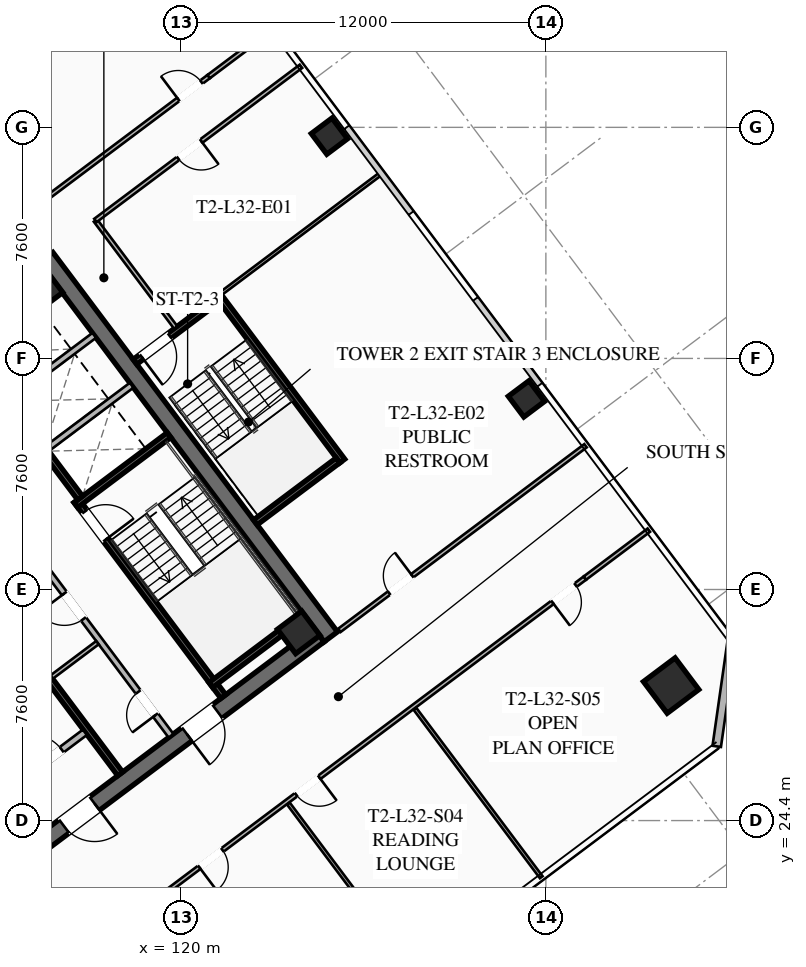
"""IFC4 building model, lengths in metres.
Left out: names, types, materials, properties, quantities, classifications, styles, units other than length and angle.
Written with IfcOpenShell. Run it as: python <this file> out.ifc"""

import sys

from ifc_helpers import new_model, si_unit, direction, frame, frame_2d, origin, origin_2d, place, context, subcontext, project, spatial, rectangle, hollow_rectangle, extrude, element, fill, save


model = new_model("IFC4")
c1 = context("Model", 3, precision=1e-05, world=origin(), true_north=direction((0.0, 1.0)))
c2 = subcontext(c1, "Body", "Model", "MODEL_VIEW")
j1 = project(units=[si_unit("LENGTHUNIT", "METRE"), si_unit("PLANEANGLEUNIT", "RADIAN")], contexts=[c1])
p1 = place(None, origin())
s1 = spatial("IfcSite", under=j1, at=p1, CompositionType="ELEMENT")
p2 = place(p1, origin())
s2 = spatial("IfcBuilding", under=s1, at=p2, CompositionType="ELEMENT")
p3 = place(p2, frame((0.0, 0.0, 121.5)))
s3 = spatial("IfcBuildingStorey", under=s2, at=p3, CompositionType="ELEMENT", Elevation=121.5)
p4 = place(p3, frame((115.564, 42.923, 0.0), z_axis=(0.0, 0.0, 1.0), x_axis=(0.600005007985, -0.799996243986, 0.0)))
e1 = element("IfcWall", 1, at=p4, inside=s3, PredefinedType="SHEAR", context=c2, shape_type="SweptSolid", body=[
    extrude(rectangle(XDim=15.6, YDim=0.55, at=frame_2d((7.8, 0.0))), origin(), (0.0, 0.0, 1.0), 3.55),
])
p5 = place(p3, frame((124.539, 30.498, 0.0), z_axis=(0.0, 0.0, 1.0), x_axis=(-0.799998054672, -0.600002593761, 0.0)))
e2 = element("IfcWall", 2, at=p5, inside=s3, PredefinedType="SHEAR", context=c2, shape_type="SweptSolid", body=[
    extrude(rectangle(XDim=15.06, YDim=0.55, at=frame_2d((7.53, 0.0))), origin(), (0.0, 0.0, 1.0), 3.55),
])
p6 = place(p5, frame((9.23, 0.0, 0.0)))
e3 = element("IfcOpeningElement", 3, at=p6, cuts=e2, PredefinedType="OPENING", context=c2, shape_type="SweptSolid", body=[
    extrude(rectangle(XDim=1.25, YDim=2.25, at=frame_2d((0.625, 1.125))), frame((0.0, 0.285, 0.0), z_axis=(0.0, -1.0, 0.0), x_axis=(1.0, 0.0, 0.0)), (0.0, 0.0, 1.0), 0.57),
])
p7 = place(p5, frame((4.18, 0.0, 0.0)))
e4 = element("IfcOpeningElement", 4, at=p7, cuts=e2, PredefinedType="OPENING", context=c2, shape_type="SweptSolid", body=[
    extrude(rectangle(XDim=1.25, YDim=2.25, at=frame_2d((0.625, 1.125))), frame((0.0, 0.285, 0.0), z_axis=(0.0, -1.0, 0.0), x_axis=(1.0, 0.0, 0.0)), (0.0, 0.0, 1.0), 0.57),
])
for number, where, z_axis, x_axis in (
    (5, (123.87, 30.59, 0.0), (0.0, 0.0, 1.0), (0.8, 0.6, 0.0)),
    (6, (115.41, 41.87, 0.0), (0.0, 0.0, 1.0), (0.8, 0.6, 0.0)),
):
    element("IfcColumn", number, at=place(p3, frame(where, z_axis=z_axis, x_axis=x_axis)), inside=s3, PredefinedType="COLUMN", context=c2, shape_type="SweptSolid", body=[
        extrude(hollow_rectangle(XDim=1.0, YDim=1.0, WallThickness=0.04, at=origin_2d()), origin(), (0.0, 0.0, 1.0), 3.37),
    ])
p8 = place(p3, frame((136.12, 28.84, 0.0), z_axis=(0.0, 0.0, 1.0), x_axis=(0.799999996291, 0.600000004945, 0.0)))
e7 = element("IfcColumn", 7, at=p8, inside=s3, PredefinedType="COLUMN", context=c2, shape_type="SweptSolid", body=[
    extrude(hollow_rectangle(XDim=1.3, YDim=1.3, WallThickness=0.05, at=origin_2d()), origin(), (0.0, 0.0, 1.0), 3.37),
])
for number, where, z_axis, x_axis in (
    (8, (131.36, 38.27, 0.0), (0.0, 0.0, 1.0), (0.8, 0.6, 0.0)),
    (9, (124.88, 46.91, 0.0), (0.0, 0.0, 1.0), (0.8, 0.6, 0.0)),
):
    element("IfcColumn", number, at=place(p3, frame(where, z_axis=z_axis, x_axis=x_axis)), inside=s3, PredefinedType="COLUMN", context=c2, shape_type="SweptSolid", body=[
        extrude(hollow_rectangle(XDim=0.85, YDim=0.85, WallThickness=0.035, at=origin_2d()), origin(), (0.0, 0.0, 1.0), 3.37),
    ])
p9 = place(p3, frame((138.12, 30.34, 0.0), z_axis=(0.0, 0.0, 1.0), x_axis=(-0.141421356237, -0.989949493661, 0.0)))
e10 = element("IfcWall", 10, at=p9, inside=s3, PredefinedType="SOLIDWALL", context=c2, shape_type="SweptSolid", body=[
    extrude(rectangle(XDim=3.536, YDim=0.28, at=frame_2d((1.768, 0.0))), origin(), (0.0, 0.0, 1.0), 3.37),
])
p10 = place(p3, frame((116.56, 34.92, 0.0), z_axis=(0.0, 0.0, 1.0), x_axis=(0.59999029481, -0.8000072788, 0.0)))
e11 = element("IfcWall", 11, at=p10, inside=s3, PredefinedType="SHEAR", context=c2, shape_type="SweptSolid", body=[
    extrude(rectangle(XDim=8.05, YDim=0.2, at=frame_2d((4.025, 0.0))), origin(), (0.0, 0.0, 1.0), 3.37),
])
p11 = place(p10, frame((0.45, 0.0, 0.0)))
e12 = element("IfcOpeningElement", 12, at=p11, cuts=e11, PredefinedType="OPENING", context=c2, shape_type="SweptSolid", body=[
    extrude(rectangle(XDim=1.15, YDim=2.2, at=frame_2d((0.575, 1.1))), frame((0.0, 0.11, 0.0), z_axis=(0.0, -1.0, 0.0), x_axis=(1.0, 0.0, 0.0)), (0.0, 0.0, 1.0), 0.22),
])
for number, where, z_axis, x_axis in (
    (13, (116.54, 34.78, 0.0), (0.0, 0.0, 1.0), (0.8, 0.6, 0.0)),
    (14, (120.98, 28.86, 0.0), (0.0, 0.0, 1.0), (0.8, 0.6, 0.0)),
):
    element("IfcWall", number, at=place(p3, frame(where, z_axis=z_axis, x_axis=x_axis)), inside=s3, PredefinedType="SHEAR", context=c2, shape_type="SweptSolid", body=[
        extrude(rectangle(XDim=3.83, YDim=0.2, at=frame_2d((1.915, 0.0))), origin(), (0.0, 0.0, 1.0), 3.37),
    ])
p12 = place(p3, frame((117.998, 25.936, 0.0), z_axis=(0.0, 0.0, 1.0), x_axis=(-0.600002693989, 0.799997979501, 0.0)))
e15 = element("IfcWall", 15, at=p12, inside=s3, PredefinedType="SHEAR", context=c2, shape_type="SweptSolid", body=[
    extrude(rectangle(XDim=14.5, YDim=0.2, at=frame_2d((7.25, 0.0))), origin(), (0.0, 0.0, 1.0), 3.37),
])
p13 = place(p3, frame((114.316, 25.412, 0.0), z_axis=(0.0, 0.0, 1.0), x_axis=(0.800018601094, 0.59997519774, 0.0)))
e16 = element("IfcWall", 16, at=p13, inside=s3, PredefinedType="SOLIDWALL", context=c2, shape_type="SweptSolid", body=[
    extrude(rectangle(XDim=3.15, YDim=0.22, at=frame_2d((1.575, 0.0))), origin(), (0.0, 0.0, 1.0), 2.723),
])
p14 = place(p13, frame((0.95, 0.0, 0.0)))
e17 = element("IfcOpeningElement", 17, at=p14, cuts=e16, PredefinedType="OPENING", context=c2, shape_type="SweptSolid", body=[
    extrude(rectangle(XDim=1.25, YDim=2.25, at=frame_2d((0.625, 1.125))), frame((0.0, 0.12, 0.0), z_axis=(0.0, -1.0, 0.0), x_axis=(1.0, 0.0, 0.0)), (0.0, 0.0, 1.0), 0.24),
])
p15 = place(p3, frame((112.81, 40.17, 0.0), z_axis=(0.0, 0.0, 1.0), x_axis=(0.599993943644, -0.800004542231, 0.0)))
e18 = element("IfcWall", 18, at=p15, inside=s3, PredefinedType="SHEAR", context=c2, shape_type="SweptSolid", body=[
    extrude(rectangle(XDim=6.45, YDim=0.2, at=frame_2d((3.225, 0.0))), origin(), (0.0, 0.0, 1.0), 3.37),
])
for number, where, z_axis, x_axis in (
    (19, (115.59, 36.63, 0.0), (0.0, 0.0, 1.0), (0.8, 0.6, 0.0)),
    (20, (114.36, 38.27, 0.0), (0.0, 0.0, 1.0), (0.8, 0.6, 0.0)),
):
    element("IfcWall", number, at=place(p3, frame(where, z_axis=z_axis, x_axis=x_axis)), inside=s3, PredefinedType="SOLIDWALL", context=c2, shape_type="SweptSolid", body=[
        extrude(rectangle(XDim=3.48, YDim=0.2, at=frame_2d((1.74, 0.0))), origin(), (0.0, 0.0, 1.0), 3.37),
    ])
p16 = place(p3, frame((119.67, 27.19, 0.0), z_axis=(0.0, 0.0, 1.0), x_axis=(-0.599988677396, 0.800008491828, 0.0)))
e21 = element("IfcWall", 21, at=p16, inside=s3, PredefinedType="SOLIDWALL", context=c2, shape_type="SweptSolid", body=[
    extrude(rectangle(XDim=6.9, YDim=0.2, at=frame_2d((3.45, 0.0))), origin(), (0.0, 0.0, 1.0), 2.723),
])
p17 = place(p16, frame((0.85, 0.0, 0.0)))
e22 = element("IfcOpeningElement", 22, at=p17, cuts=e21, PredefinedType="OPENING", context=c2, shape_type="SweptSolid", body=[
    extrude(rectangle(XDim=0.95, YDim=2.05, at=frame_2d((0.475, 1.025))), frame((0.0, 0.11, 0.0), z_axis=(0.0, -1.0, 0.0), x_axis=(1.0, 0.0, 0.0)), (0.0, 0.0, 1.0), 0.22),
])
p18 = place(p16, frame((4.8, 0.0, 0.0)))
e23 = element("IfcOpeningElement", 23, at=p18, cuts=e21, PredefinedType="OPENING", context=c2, shape_type="SweptSolid", body=[
    extrude(rectangle(XDim=1.05, YDim=2.2, at=frame_2d((0.525, 1.1))), frame((0.0, 0.11, 0.0), z_axis=(0.0, -1.0, 0.0), x_axis=(1.0, 0.0, 0.0)), (0.0, 0.0, 1.0), 0.22),
])
p19 = place(p3, frame((115.746, 29.122, 0.0), z_axis=(0.0, 0.0, 1.0), x_axis=(0.8, 0.6, 0.0)))
e24 = element("IfcWall", 24, at=p19, inside=s3, PredefinedType="PARTITIONING", context=c2, shape_type="SweptSolid", body=[
    extrude(rectangle(XDim=1.88, YDim=0.135, at=frame_2d((0.94, 0.0))), origin(), (0.0, 0.0, 1.0), 2.723),
])
p20 = place(p3, frame((125.304, 36.228, 0.0), z_axis=(0.0, 0.0, 1.0), x_axis=(-0.59998851072, 0.800008616831, 0.0)))
e25 = element("IfcWall", 25, at=p20, inside=s3, PredefinedType="SHEAR", context=c2, shape_type="SweptSolid", body=[
    extrude(rectangle(XDim=6.8, YDim=0.2, at=frame_2d((3.4, 0.0))), origin(), (0.0, 0.0, 1.0), 3.37),
])
p21 = place(p3, frame((121.204, 41.528, 0.0), z_axis=(0.0, 0.0, 1.0), x_axis=(-0.800017232136, -0.599977023131, 0.0)))
e26 = element("IfcWall", 26, at=p21, inside=s3, PredefinedType="SHEAR", context=c2, shape_type="SweptSolid", body=[
    extrude(rectangle(XDim=3.4, YDim=0.2, at=frame_2d((1.7, 0.0))), origin(), (0.0, 0.0, 1.0), 3.37),
])
p22 = place(p21, frame((1.975, 0.0, 0.0)))
e27 = element("IfcOpeningElement", 27, at=p22, cuts=e26, PredefinedType="OPENING", context=c2, shape_type="SweptSolid", body=[
    extrude(rectangle(XDim=1.15, YDim=2.2, at=frame_2d((0.575, 1.1))), frame((0.0, 0.11, 0.0), z_axis=(0.0, -1.0, 0.0), x_axis=(1.0, 0.0, 0.0)), (0.0, 0.0, 1.0), 0.22),
])
p23 = place(p3, frame((122.444, 34.208, 0.0), z_axis=(0.0, 0.0, 1.0), x_axis=(0.79999138319, 0.600011488909, 0.0)))
e28 = element("IfcWall", 28, at=p23, inside=s3, PredefinedType="SHEAR", context=c2, shape_type="SweptSolid", body=[
    extrude(rectangle(XDim=3.4, YDim=0.2, at=frame_2d((1.7, 0.0))), origin(), (0.0, 0.0, 1.0), 3.37),
])
p24 = place(p3, frame((119.824, 40.618, 0.0), z_axis=(0.0, 0.0, 1.0), x_axis=(-0.599982243973, 0.800013316712, 0.0)))
e29 = element("IfcWall", 29, at=p24, inside=s3, PredefinedType="PARTITIONING", context=c2, shape_type="SweptSolid", body=[
    extrude(rectangle(XDim=4.4, YDim=0.135, at=frame_2d((2.2, 0.0))), origin(), (0.0, 0.0, 1.0), 2.723),
])
p25 = place(p3, frame((95.87, 30.09, 0.0), z_axis=(0.0, 0.0, 1.0), x_axis=(0.799997191971, 0.600003744021, 0.0)))
e30 = element("IfcWall", 30, at=p25, inside=s3, PredefinedType="PARTITIONING", context=c2, shape_type="SweptSolid", body=[
    extrude(rectangle(XDim=31.3, YDim=0.135, at=frame_2d((15.65, 0.0))), origin(), (0.0, 0.0, 1.0), 2.723),
])
p26 = place(p25, frame((0.3, 0.0, 0.0)))
e31 = element("IfcOpeningElement", 31, at=p26, cuts=e30, PredefinedType="OPENING", context=c2, shape_type="SweptSolid", body=[
    extrude(rectangle(XDim=0.95, YDim=2.05, at=frame_2d((0.475, 1.025))), frame((0.0, 0.077, 0.0), z_axis=(0.0, -1.0, 0.0), x_axis=(1.0, 0.0, 0.0)), (0.0, 0.0, 1.0), 0.155),
])
p27 = place(p25, frame((30.05, 0.0, 0.0)))
e32 = element("IfcOpeningElement", 32, at=p27, cuts=e30, PredefinedType="OPENING", context=c2, shape_type="SweptSolid", body=[
    extrude(rectangle(XDim=0.95, YDim=2.05, at=frame_2d((0.475, 1.025))), frame((0.0, 0.077, 0.0), z_axis=(0.0, -1.0, 0.0), x_axis=(1.0, 0.0, 0.0)), (0.0, 0.0, 1.0), 0.155),
])
p28 = place(p3, frame((120.91, 48.87, 0.0), z_axis=(0.0, 0.0, 1.0), x_axis=(0.80002227902, 0.599970293491, 0.0)))
e33 = element("IfcWall", 33, at=p28, inside=s3, PredefinedType="PARTITIONING", context=c2, shape_type="SweptSolid", body=[
    extrude(rectangle(XDim=2.63, YDim=0.135, at=frame_2d((1.315, 0.0))), origin(), (0.0, 0.0, 1.0), 2.723),
])
p29 = place(p3, frame((133.282, 32.374, 0.0), z_axis=(0.0, 0.0, 1.0), x_axis=(-0.8, -0.6, 0.0)))
e34 = element("IfcWall", 34, at=p29, inside=s3, PredefinedType="PARTITIONING", context=c2, shape_type="SweptSolid", body=[
    extrude(rectangle(XDim=31.3, YDim=0.135, at=frame_2d((15.65, 0.0))), origin(), (0.0, 0.0, 1.0), 2.723),
])
p30 = place(p29, frame((29.97, 0.0, 0.0)))
e35 = element("IfcOpeningElement", 35, at=p30, cuts=e34, PredefinedType="OPENING", context=c2, shape_type="SweptSolid", body=[
    extrude(rectangle(XDim=0.95, YDim=2.05, at=frame_2d((0.475, 1.025))), frame((0.0, 0.077, 0.0), z_axis=(0.0, -1.0, 0.0), x_axis=(1.0, 0.0, 0.0)), (0.0, 0.0, 1.0), 0.155),
])
p31 = place(p29, frame((19.151, 0.0, 0.0)))
e36 = element("IfcOpeningElement", 36, at=p31, cuts=e34, PredefinedType="OPENING", context=c2, shape_type="SweptSolid", body=[
    extrude(rectangle(XDim=0.95, YDim=2.05, at=frame_2d((0.475, 1.025))), frame((0.0, 0.077, 0.0), z_axis=(0.0, -1.0, 0.0), x_axis=(1.0, 0.0, 0.0)), (0.0, 0.0, 1.0), 0.155),
])
p32 = place(p29, frame((14.901, 0.0, 0.0)))
e37 = element("IfcOpeningElement", 37, at=p32, cuts=e34, PredefinedType="OPENING", context=c2, shape_type="SweptSolid", body=[
    extrude(rectangle(XDim=0.95, YDim=2.05, at=frame_2d((0.475, 1.025))), frame((0.0, 0.077, 0.0), z_axis=(0.0, -1.0, 0.0), x_axis=(1.0, 0.0, 0.0)), (0.0, 0.0, 1.0), 0.155),
])
p33 = place(p29, frame((10.92, 0.0, 0.0)))
e38 = element("IfcOpeningElement", 38, at=p33, cuts=e34, PredefinedType="OPENING", context=c2, shape_type="SweptSolid", body=[
    extrude(rectangle(XDim=0.95, YDim=2.05, at=frame_2d((0.475, 1.025))), frame((0.0, 0.077, 0.0), z_axis=(0.0, -1.0, 0.0), x_axis=(1.0, 0.0, 0.0)), (0.0, 0.0, 1.0), 0.155),
])
p34 = place(p29, frame((0.38, 0.0, 0.0)))
e39 = element("IfcOpeningElement", 39, at=p34, cuts=e34, PredefinedType="OPENING", context=c2, shape_type="SweptSolid", body=[
    extrude(rectangle(XDim=0.95, YDim=2.05, at=frame_2d((0.475, 1.025))), frame((0.0, 0.077, 0.0), z_axis=(0.0, -1.0, 0.0), x_axis=(1.0, 0.0, 0.0)), (0.0, 0.0, 1.0), 0.155),
])
p35 = place(p3, frame((133.282, 32.374, 0.0), z_axis=(0.0, 0.0, 1.0), x_axis=(0.80002227902, 0.599970293491, 0.0)))
e40 = element("IfcWall", 40, at=p35, inside=s3, PredefinedType="PARTITIONING", context=c2, shape_type="SweptSolid", body=[
    extrude(rectangle(XDim=2.63, YDim=0.135, at=frame_2d((1.315, 0.0))), origin(), (0.0, 0.0, 1.0), 2.723),
])
p36 = place(p3, frame((127.688, 19.416, 0.0), z_axis=(0.0, 0.0, 1.0), x_axis=(-0.6, 0.8, 0.0)))
e41 = element("IfcWall", 41, at=p36, inside=s3, PredefinedType="PARTITIONING", context=c2, shape_type="SweptSolid", body=[
    extrude(rectangle(XDim=6.93, YDim=0.11, at=frame_2d((3.465, 0.0))), origin(), (0.0, 0.0, 1.0), 2.723),
])
p37 = place(p3, frame((131.848, 22.536, 0.0), z_axis=(0.0, 0.0, 1.0), x_axis=(-0.599983090003, 0.800012682219, 0.0)))
e42 = element("IfcWall", 42, at=p37, inside=s3, PredefinedType="PARTITIONING", context=c2, shape_type="SweptSolid", body=[
    extrude(rectangle(XDim=6.93, YDim=0.11, at=frame_2d((3.465, 0.0))), origin(), (0.0, 0.0, 1.0), 2.723),
])
p38 = place(p3, frame((123.944, 49.208, 0.0), z_axis=(0.0, 0.0, 1.0), x_axis=(-0.799996532921, -0.600004622744, 0.0)))
e43 = element("IfcWall", 43, at=p38, inside=s3, PredefinedType="PARTITIONING", context=c2, shape_type="SweptSolid", body=[
    extrude(rectangle(XDim=8.45, YDim=0.135, at=frame_2d((4.225, 0.0))), origin(), (0.0, 0.0, 1.0), 2.723),
])
p39 = place(p38, frame((4.1, 0.0, 0.0)))
e44 = element("IfcOpeningElement", 44, at=p39, cuts=e43, PredefinedType="OPENING", context=c2, shape_type="SweptSolid", body=[
    extrude(rectangle(XDim=0.95, YDim=2.05, at=frame_2d((0.475, 1.025))), frame((0.0, 0.077, 0.0), z_axis=(0.0, -1.0, 0.0), x_axis=(1.0, 0.0, 0.0)), (0.0, 0.0, 1.0), 0.155),
])
p40 = place(p3, frame((125.208, 30.656, 0.0), z_axis=(0.0, 0.0, 1.0), x_axis=(0.799997105034, 0.600003859935, 0.0)))
e45 = element("IfcWall", 45, at=p40, inside=s3, PredefinedType="PARTITIONING", context=c2, shape_type="SweptSolid", body=[
    extrude(rectangle(XDim=10.12, YDim=0.135, at=frame_2d((5.06, 0.0))), origin(), (0.0, 0.0, 1.0), 2.723),
])
p41 = place(p40, frame((2.045, 0.0, 0.0)))
e46 = element("IfcOpeningElement", 46, at=p41, cuts=e45, PredefinedType="OPENING", context=c2, shape_type="SweptSolid", body=[
    extrude(rectangle(XDim=0.95, YDim=2.05, at=frame_2d((0.475, 1.025))), frame((0.0, 0.077, 0.0), z_axis=(0.0, -1.0, 0.0), x_axis=(1.0, 0.0, 0.0)), (0.0, 0.0, 1.0), 0.155),
])
p42 = place(p3, frame((126.584, 45.688, 0.0), z_axis=(0.0, 0.0, 1.0), x_axis=(-0.800004438899, -0.599994081423, 0.0)))
e47 = element("IfcWall", 47, at=p42, inside=s3, PredefinedType="PARTITIONING", context=c2, shape_type="SweptSolid", body=[
    extrude(rectangle(XDim=6.6, YDim=0.11, at=frame_2d((3.3, 0.0))), origin(), (0.0, 0.0, 1.0), 2.723),
])
p43 = place(p6, origin())
e48 = element("IfcDoor", 48, at=p43, inside=s3, OperationType="SINGLE_SWING_LEFT", PredefinedType="DOOR", context=c2, shape_type="SweptSolid", body=[
    extrude(rectangle(XDim=1.25, YDim=2.25, at=frame_2d((0.625, 1.125))), frame((0.0, 0.025, 0.0), z_axis=(0.0, -1.0, 0.0), x_axis=(1.0, 0.0, 0.0)), (0.0, 0.0, 1.0), 0.05),
])
fill(e3, e48)
p44 = place(p7, origin())
e49 = element("IfcDoor", 49, at=p44, inside=s3, OperationType="SINGLE_SWING_RIGHT", PredefinedType="DOOR", context=c2, shape_type="SweptSolid", body=[
    extrude(rectangle(XDim=1.25, YDim=2.25, at=frame_2d((0.625, 1.125))), frame((0.0, 0.025, 0.0), z_axis=(0.0, -1.0, 0.0), x_axis=(1.0, 0.0, 0.0)), (0.0, 0.0, 1.0), 0.05),
])
fill(e4, e49)
p45 = place(p11, origin())
e50 = element("IfcDoor", 50, at=p45, inside=s3, OperationType="SINGLE_SWING_RIGHT", PredefinedType="DOOR", context=c2, shape_type="SweptSolid", body=[
    extrude(rectangle(XDim=1.15, YDim=2.2, at=frame_2d((0.575, 1.1))), frame((0.0, 0.025, 0.0), z_axis=(0.0, -1.0, 0.0), x_axis=(1.0, 0.0, 0.0)), (0.0, 0.0, 1.0), 0.05),
])
fill(e12, e50)
p46 = place(p14, origin())
e51 = element("IfcDoor", 51, at=p46, inside=s3, OperationType="SINGLE_SWING_LEFT", PredefinedType="DOOR", context=c2, shape_type="SweptSolid", body=[
    extrude(rectangle(XDim=1.25, YDim=2.25, at=frame_2d((0.625, 1.125))), frame((0.0, 0.025, 0.0), z_axis=(0.0, -1.0, 0.0), x_axis=(1.0, 0.0, 0.0)), (0.0, 0.0, 1.0), 0.05),
])
fill(e17, e51)
p47 = place(p17, origin())
e52 = element("IfcDoor", 52, at=p47, inside=s3, OperationType="SINGLE_SWING_LEFT", PredefinedType="DOOR", context=c2, shape_type="SweptSolid", body=[
    extrude(rectangle(XDim=0.95, YDim=2.05, at=frame_2d((0.475, 1.025))), frame((0.0, 0.025, 0.0), z_axis=(0.0, -1.0, 0.0), x_axis=(1.0, 0.0, 0.0)), (0.0, 0.0, 1.0), 0.05),
])
fill(e22, e52)
p48 = place(p18, origin())
e53 = element("IfcDoor", 53, at=p48, inside=s3, OperationType="SINGLE_SWING_RIGHT", PredefinedType="DOOR", context=c2, shape_type="SweptSolid", body=[
    extrude(rectangle(XDim=1.05, YDim=2.2, at=frame_2d((0.525, 1.1))), frame((0.0, 0.025, 0.0), z_axis=(0.0, -1.0, 0.0), x_axis=(1.0, 0.0, 0.0)), (0.0, 0.0, 1.0), 0.05),
])
fill(e23, e53)
p49 = place(p22, origin())
e54 = element("IfcDoor", 54, at=p49, inside=s3, OperationType="SINGLE_SWING_RIGHT", PredefinedType="DOOR", context=c2, shape_type="SweptSolid", body=[
    extrude(rectangle(XDim=1.15, YDim=2.2, at=frame_2d((0.575, 1.1))), frame((0.0, 0.025, 0.0), z_axis=(0.0, -1.0, 0.0), x_axis=(1.0, 0.0, 0.0)), (0.0, 0.0, 1.0), 0.05),
])
fill(e27, e54)
p50 = place(p27, origin())
e55 = element("IfcDoor", 55, at=p50, inside=s3, OperationType="SINGLE_SWING_LEFT", PredefinedType="DOOR", context=c2, shape_type="SweptSolid", body=[
    extrude(rectangle(XDim=0.95, YDim=2.05, at=frame_2d((0.475, 1.025))), frame((0.0, 0.025, 0.0), z_axis=(0.0, -1.0, 0.0), x_axis=(1.0, 0.0, 0.0)), (0.0, 0.0, 1.0), 0.05),
])
fill(e32, e55)
p51 = place(p32, origin())
e56 = element("IfcDoor", 56, at=p51, inside=s3, OperationType="SINGLE_SWING_RIGHT", PredefinedType="DOOR", context=c2, shape_type="SweptSolid", body=[
    extrude(rectangle(XDim=0.95, YDim=2.05, at=frame_2d((0.475, 1.025))), frame((0.0, 0.025, 0.0), z_axis=(0.0, -1.0, 0.0), x_axis=(1.0, 0.0, 0.0)), (0.0, 0.0, 1.0), 0.05),
])
fill(e37, e56)
p52 = place(p33, origin())
e57 = element("IfcDoor", 57, at=p52, inside=s3, OperationType="SINGLE_SWING_LEFT", PredefinedType="DOOR", context=c2, shape_type="SweptSolid", body=[
    extrude(rectangle(XDim=0.95, YDim=2.05, at=frame_2d((0.475, 1.025))), frame((0.0, 0.025, 0.0), z_axis=(0.0, -1.0, 0.0), x_axis=(1.0, 0.0, 0.0)), (0.0, 0.0, 1.0), 0.05),
])
fill(e38, e57)
p53 = place(p34, origin())
e58 = element("IfcDoor", 58, at=p53, inside=s3, OperationType="SINGLE_SWING_RIGHT", PredefinedType="DOOR", context=c2, shape_type="SweptSolid", body=[
    extrude(rectangle(XDim=0.95, YDim=2.05, at=frame_2d((0.475, 1.025))), frame((0.0, 0.025, 0.0), z_axis=(0.0, -1.0, 0.0), x_axis=(1.0, 0.0, 0.0)), (0.0, 0.0, 1.0), 0.05),
])
fill(e39, e58)
p54 = place(p39, origin())
e59 = element("IfcDoor", 59, at=p54, inside=s3, OperationType="SINGLE_SWING_LEFT", PredefinedType="DOOR", context=c2, shape_type="SweptSolid", body=[
    extrude(rectangle(XDim=0.95, YDim=2.05, at=frame_2d((0.475, 1.025))), frame((0.0, 0.025, 0.0), z_axis=(0.0, -1.0, 0.0), x_axis=(1.0, 0.0, 0.0)), (0.0, 0.0, 1.0), 0.05),
])
fill(e44, e59)
p55 = place(p41, origin())
e60 = element("IfcDoor", 60, at=p55, inside=s3, OperationType="SINGLE_SWING_RIGHT", PredefinedType="DOOR", context=c2, shape_type="SweptSolid", body=[
    extrude(rectangle(XDim=0.95, YDim=2.05, at=frame_2d((0.475, 1.025))), frame((0.0, 0.025, 0.0), z_axis=(0.0, -1.0, 0.0), x_axis=(1.0, 0.0, 0.0)), (0.0, 0.0, 1.0), 0.05),
])
fill(e46, e60)
save(model, sys.argv[1])
